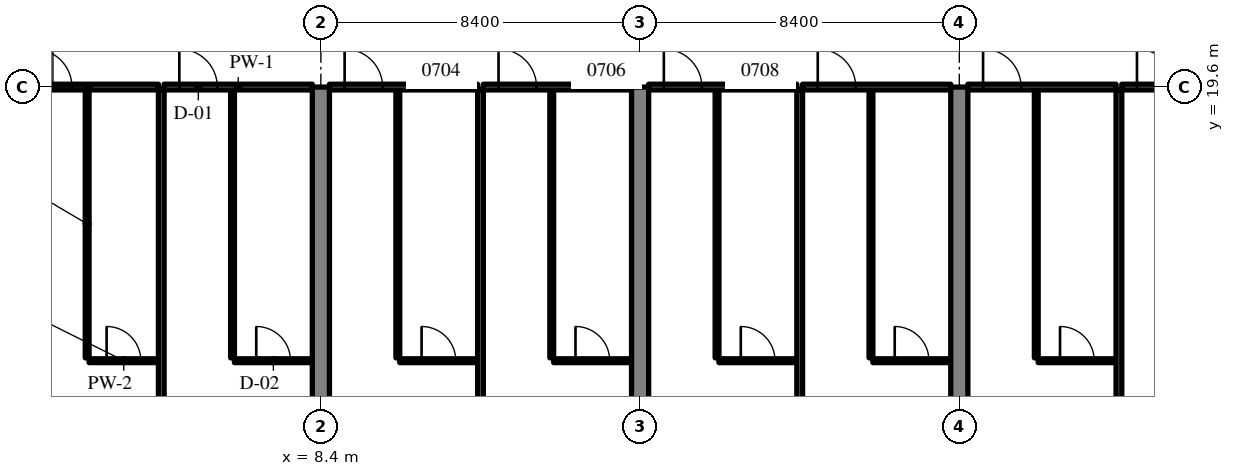
"""IFC4 building model, lengths in metres.
Left out: names, types, materials, properties, quantities, classifications, styles, units other than length and angle.
Written with IfcOpenShell. Run it as: python <this file> out.ifc"""

import sys

from ifc_helpers import new_model, si_unit, direction, frame, frame_2d, origin, place, context, subcontext, project, spatial, rectangle, extrude, source, transform, mapped, element, fill, save


model = new_model("IFC4")
c1 = context("Model", 3, precision=1e-05, world=origin(), true_north=direction((0.0, 1.0)))
c2 = subcontext(c1, "Body", "Model", "MODEL_VIEW")
j1 = project(units=[si_unit("LENGTHUNIT", "METRE"), si_unit("PLANEANGLEUNIT", "RADIAN")], contexts=[c1])
p1 = place(None, origin())
s1 = spatial("IfcSite", under=j1, at=p1, CompositionType="ELEMENT")
p2 = place(p1, origin())
s2 = spatial("IfcBuilding", under=s1, at=p2, CompositionType="ELEMENT")
p3 = place(p2, frame((0.0, 0.0, 35.4)))
s3 = spatial("IfcBuildingStorey", under=s2, at=p3, CompositionType="ELEMENT", Elevation=35.4)
m1 = source(origin(), c2, "Body", "SweptSolid", [
    extrude(rectangle(XDim=19.6, YDim=0.45, at=frame_2d((9.8, 0.0))), origin(), (0.0, 0.0, 1.0), 3.52),
])
for number, where, z_axis, x_axis in (
    (1, (8.4, 0.0, 0.0), (0.0, 0.0, 1.0), (0.0, 1.0, 0.0)),
    (2, (16.8, 0.0, 0.0), (0.0, 0.0, 1.0), (0.0, 1.0, 0.0)),
    (3, (25.2, 0.0, 0.0), (0.0, 0.0, 1.0), (0.0, 1.0, 0.0)),
):
    element("IfcWall", number, at=place(p3, frame(where, z_axis=z_axis, x_axis=x_axis)), inside=s3, PredefinedType="SHEAR", context=c2, shape_type="MappedRepresentation", body=[
        mapped(m1, transform((0.0, 0.0, 0.0), scale=1.0)),
    ])
m2 = source(origin(), c2, "Body", "SweptSolid", [
    extrude(rectangle(XDim=7.05, YDim=0.1, at=frame_2d((3.525, 0.0))), origin(), (0.0, 0.0, 1.0), 3.52),
])
p4 = place(p3, frame((2.25, 12.475, 0.0), z_axis=(0.0, 0.0, 1.0), x_axis=(0.0, 1.0, 0.0)))
e4 = element("IfcWall", 4, at=p4, inside=s3, PredefinedType="PARTITIONING", context=c2, shape_type="MappedRepresentation", body=[
    mapped(m2, transform((0.0, 0.0, 0.0), scale=1.0)),
])
m3 = source(origin(), c2, "Body", "SweptSolid", [
    extrude(rectangle(XDim=1.825, YDim=0.1, at=frame_2d((0.913, 0.0))), origin(), (0.0, 0.0, 1.0), 3.52),
])
p5 = place(p3, frame((2.3, 12.4, 0.0), z_axis=(0.0, 0.0, 1.0), x_axis=(1.0, 0.0, 0.0)))
e5 = element("IfcWall", 5, at=p5, inside=s3, PredefinedType="PARTITIONING", context=c2, shape_type="MappedRepresentation", body=[
    mapped(m3, transform((0.0, 0.0, 0.0), scale=1.0)),
])
m4 = source(origin(), c2, "Body", "SweptSolid", [
    extrude(rectangle(XDim=0.9, YDim=2.1, at=frame_2d((0.45, 1.05))), frame((0.0, 0.06, 0.0), z_axis=(0.0, -1.0, 0.0), x_axis=(1.0, 0.0, 0.0)), (0.0, 0.0, 1.0), 0.12),
])
p6 = place(p5, frame((0.462, 0.0, 0.0)))
e6 = element("IfcOpeningElement", 6, at=p6, cuts=e5, PredefinedType="OPENING", context=c2, shape_type="MappedRepresentation", body=[
    mapped(m4, transform((0.0, 0.0, 0.0), scale=1.0)),
])
m5 = source(origin(), c2, "Body", "SweptSolid", [
    extrude(rectangle(XDim=3.675, YDim=0.15, at=frame_2d((1.837, 0.0))), origin(), (0.0, 0.0, 1.0), 2.82),
])
p7 = place(p3, frame((0.45, 19.6, 0.0), z_axis=(0.0, 0.0, 1.0), x_axis=(1.0, 0.0, 0.0)))
e7 = element("IfcWall", 7, at=p7, inside=s3, PredefinedType="PARTITIONING", context=c2, shape_type="MappedRepresentation", body=[
    mapped(m5, transform((0.0, 0.0, 0.0), scale=1.0)),
])
m6 = source(origin(), c2, "Body", "SweptSolid", [
    extrude(rectangle(XDim=1.0, YDim=2.1, at=frame_2d((0.5, 1.05))), frame((0.0, 0.085, 0.0), z_axis=(0.0, -1.0, 0.0), x_axis=(1.0, 0.0, 0.0)), (0.0, 0.0, 1.0), 0.17),
])
p8 = place(p7, frame((0.4, 0.0, 0.0)))
e8 = element("IfcOpeningElement", 8, at=p8, cuts=e7, PredefinedType="OPENING", context=c2, shape_type="MappedRepresentation", body=[
    mapped(m6, transform((0.0, 0.0, 0.0), scale=1.0)),
])
p9 = place(p3, frame((6.075, 12.475, 0.0), z_axis=(0.0, 0.0, 1.0), x_axis=(0.0, 1.0, 0.0)))
e9 = element("IfcWall", 9, at=p9, inside=s3, PredefinedType="PARTITIONING", context=c2, shape_type="MappedRepresentation", body=[
    mapped(m2, transform((0.0, 0.0, 0.0), scale=1.0)),
])
m7 = source(origin(), c2, "Body", "SweptSolid", [
    extrude(rectangle(XDim=2.05, YDim=0.1, at=frame_2d((1.025, 0.0))), origin(), (0.0, 0.0, 1.0), 3.52),
])
p10 = place(p3, frame((6.125, 12.4, 0.0), z_axis=(0.0, 0.0, 1.0), x_axis=(1.0, 0.0, 0.0)))
e10 = element("IfcWall", 10, at=p10, inside=s3, PredefinedType="PARTITIONING", context=c2, shape_type="MappedRepresentation", body=[
    mapped(m7, transform((0.0, 0.0, 0.0), scale=1.0)),
])
p11 = place(p10, frame((0.575, 0.0, 0.0)))
e11 = element("IfcOpeningElement", 11, at=p11, cuts=e10, PredefinedType="OPENING", context=c2, shape_type="MappedRepresentation", body=[
    mapped(m4, transform((0.0, 0.0, 0.0), scale=1.0)),
])
m8 = source(origin(), c2, "Body", "SweptSolid", [
    extrude(rectangle(XDim=3.9, YDim=0.15, at=frame_2d((1.95, 0.0))), origin(), (0.0, 0.0, 1.0), 2.82),
])
p12 = place(p3, frame((4.275, 19.6, 0.0), z_axis=(0.0, 0.0, 1.0), x_axis=(1.0, 0.0, 0.0)))
e12 = element("IfcWall", 12, at=p12, inside=s3, PredefinedType="PARTITIONING", context=c2, shape_type="MappedRepresentation", body=[
    mapped(m8, transform((0.0, 0.0, 0.0), scale=1.0)),
])
p13 = place(p12, frame((0.4, 0.0, 0.0)))
e13 = element("IfcOpeningElement", 13, at=p13, cuts=e12, PredefinedType="OPENING", context=c2, shape_type="MappedRepresentation", body=[
    mapped(m6, transform((0.0, 0.0, 0.0), scale=1.0)),
])
m9 = source(origin(), c2, "Body", "SweptSolid", [
    extrude(rectangle(XDim=18.947, YDim=0.15, at=frame_2d((9.474, 0.0))), origin(), (0.0, 0.0, 1.0), 3.52),
])
p14 = place(p3, frame((4.2, 0.578, 0.0), z_axis=(0.0, 0.0, 1.0), x_axis=(0.0, 1.0, 0.0)))
e14 = element("IfcWall", 14, at=p14, inside=s3, PredefinedType="PARTITIONING", context=c2, shape_type="MappedRepresentation", body=[
    mapped(m9, transform((0.0, 0.0, 0.0), scale=1.0)),
])
p15 = place(p3, frame((10.425, 12.475, 0.0), z_axis=(0.0, 0.0, 1.0), x_axis=(0.0, 1.0, 0.0)))
e15 = element("IfcWall", 15, at=p15, inside=s3, PredefinedType="PARTITIONING", context=c2, shape_type="MappedRepresentation", body=[
    mapped(m2, transform((0.0, 0.0, 0.0), scale=1.0)),
])
m10 = source(origin(), c2, "Body", "SweptSolid", [
    extrude(rectangle(XDim=2.05, YDim=0.1, at=frame_2d((1.025, 0.0))), origin(), (0.0, 0.0, 1.0), 3.52),
])
p16 = place(p3, frame((10.475, 12.4, 0.0), z_axis=(0.0, 0.0, 1.0), x_axis=(1.0, 0.0, 0.0)))
e16 = element("IfcWall", 16, at=p16, inside=s3, PredefinedType="PARTITIONING", context=c2, shape_type="MappedRepresentation", body=[
    mapped(m10, transform((0.0, 0.0, 0.0), scale=1.0)),
])
p17 = place(p16, frame((0.575, 0.0, 0.0)))
e17 = element("IfcOpeningElement", 17, at=p17, cuts=e16, PredefinedType="OPENING", context=c2, shape_type="MappedRepresentation", body=[
    mapped(m4, transform((0.0, 0.0, 0.0), scale=1.0)),
])
m11 = source(origin(), c2, "Body", "SweptSolid", [
    extrude(rectangle(XDim=3.9, YDim=0.15, at=frame_2d((1.95, 0.0))), origin(), (0.0, 0.0, 1.0), 2.82),
])
p18 = place(p3, frame((8.625, 19.6, 0.0), z_axis=(0.0, 0.0, 1.0), x_axis=(1.0, 0.0, 0.0)))
e18 = element("IfcWall", 18, at=p18, inside=s3, PredefinedType="PARTITIONING", context=c2, shape_type="MappedRepresentation", body=[
    mapped(m11, transform((0.0, 0.0, 0.0), scale=1.0)),
])
p19 = place(p18, frame((0.4, 0.0, 0.0)))
e19 = element("IfcOpeningElement", 19, at=p19, cuts=e18, PredefinedType="OPENING", context=c2, shape_type="MappedRepresentation", body=[
    mapped(m6, transform((0.0, 0.0, 0.0), scale=1.0)),
])
p20 = place(p3, frame((14.475, 12.475, 0.0), z_axis=(0.0, 0.0, 1.0), x_axis=(0.0, 1.0, 0.0)))
e20 = element("IfcWall", 20, at=p20, inside=s3, PredefinedType="PARTITIONING", context=c2, shape_type="MappedRepresentation", body=[
    mapped(m2, transform((0.0, 0.0, 0.0), scale=1.0)),
])
p21 = place(p3, frame((14.525, 12.4, 0.0), z_axis=(0.0, 0.0, 1.0), x_axis=(1.0, 0.0, 0.0)))
e21 = element("IfcWall", 21, at=p21, inside=s3, PredefinedType="PARTITIONING", context=c2, shape_type="MappedRepresentation", body=[
    mapped(m7, transform((0.0, 0.0, 0.0), scale=1.0)),
])
p22 = place(p21, frame((0.575, 0.0, 0.0)))
e22 = element("IfcOpeningElement", 22, at=p22, cuts=e21, PredefinedType="OPENING", context=c2, shape_type="MappedRepresentation", body=[
    mapped(m4, transform((0.0, 0.0, 0.0), scale=1.0)),
])
p23 = place(p3, frame((12.675, 19.6, 0.0), z_axis=(0.0, 0.0, 1.0), x_axis=(1.0, 0.0, 0.0)))
e23 = element("IfcWall", 23, at=p23, inside=s3, PredefinedType="PARTITIONING", context=c2, shape_type="MappedRepresentation", body=[
    mapped(m11, transform((0.0, 0.0, 0.0), scale=1.0)),
])
p24 = place(p23, frame((0.4, 0.0, 0.0)))
e24 = element("IfcOpeningElement", 24, at=p24, cuts=e23, PredefinedType="OPENING", context=c2, shape_type="MappedRepresentation", body=[
    mapped(m6, transform((0.0, 0.0, 0.0), scale=1.0)),
])
m12 = source(origin(), c2, "Body", "SweptSolid", [
    extrude(rectangle(XDim=18.625, YDim=0.15, at=frame_2d((9.312, 0.0))), origin(), (0.0, 0.0, 1.0), 3.52),
])
p25 = place(p3, frame((12.6, 0.9, 0.0), z_axis=(0.0, 0.0, 1.0), x_axis=(0.0, 1.0, 0.0)))
e25 = element("IfcWall", 25, at=p25, inside=s3, PredefinedType="PARTITIONING", context=c2, shape_type="MappedRepresentation", body=[
    mapped(m12, transform((0.0, 0.0, 0.0), scale=1.0)),
])
p26 = place(p3, frame((18.825, 12.475, 0.0), z_axis=(0.0, 0.0, 1.0), x_axis=(0.0, 1.0, 0.0)))
e26 = element("IfcWall", 26, at=p26, inside=s3, PredefinedType="PARTITIONING", context=c2, shape_type="MappedRepresentation", body=[
    mapped(m2, transform((0.0, 0.0, 0.0), scale=1.0)),
])
p27 = place(p3, frame((18.875, 12.4, 0.0), z_axis=(0.0, 0.0, 1.0), x_axis=(1.0, 0.0, 0.0)))
e27 = element("IfcWall", 27, at=p27, inside=s3, PredefinedType="PARTITIONING", context=c2, shape_type="MappedRepresentation", body=[
    mapped(m7, transform((0.0, 0.0, 0.0), scale=1.0)),
])
p28 = place(p27, frame((0.575, 0.0, 0.0)))
e28 = element("IfcOpeningElement", 28, at=p28, cuts=e27, PredefinedType="OPENING", context=c2, shape_type="MappedRepresentation", body=[
    mapped(m4, transform((0.0, 0.0, 0.0), scale=1.0)),
])
p29 = place(p3, frame((17.025, 19.6, 0.0), z_axis=(0.0, 0.0, 1.0), x_axis=(1.0, 0.0, 0.0)))
e29 = element("IfcWall", 29, at=p29, inside=s3, PredefinedType="PARTITIONING", context=c2, shape_type="MappedRepresentation", body=[
    mapped(m8, transform((0.0, 0.0, 0.0), scale=1.0)),
])
p30 = place(p29, frame((0.4, 0.0, 0.0)))
e30 = element("IfcOpeningElement", 30, at=p30, cuts=e29, PredefinedType="OPENING", context=c2, shape_type="MappedRepresentation", body=[
    mapped(m6, transform((0.0, 0.0, 0.0), scale=1.0)),
])
p31 = place(p3, frame((22.875, 12.475, 0.0), z_axis=(0.0, 0.0, 1.0), x_axis=(0.0, 1.0, 0.0)))
e31 = element("IfcWall", 31, at=p31, inside=s3, PredefinedType="PARTITIONING", context=c2, shape_type="MappedRepresentation", body=[
    mapped(m2, transform((0.0, 0.0, 0.0), scale=1.0)),
])
p32 = place(p3, frame((22.925, 12.4, 0.0), z_axis=(0.0, 0.0, 1.0), x_axis=(1.0, 0.0, 0.0)))
e32 = element("IfcWall", 32, at=p32, inside=s3, PredefinedType="PARTITIONING", context=c2, shape_type="MappedRepresentation", body=[
    mapped(m7, transform((0.0, 0.0, 0.0), scale=1.0)),
])
p33 = place(p32, frame((0.575, 0.0, 0.0)))
e33 = element("IfcOpeningElement", 33, at=p33, cuts=e32, PredefinedType="OPENING", context=c2, shape_type="MappedRepresentation", body=[
    mapped(m4, transform((0.0, 0.0, 0.0), scale=1.0)),
])
p34 = place(p3, frame((21.075, 19.6, 0.0), z_axis=(0.0, 0.0, 1.0), x_axis=(1.0, 0.0, 0.0)))
e34 = element("IfcWall", 34, at=p34, inside=s3, PredefinedType="PARTITIONING", context=c2, shape_type="MappedRepresentation", body=[
    mapped(m8, transform((0.0, 0.0, 0.0), scale=1.0)),
])
p35 = place(p34, frame((0.4, 0.0, 0.0)))
e35 = element("IfcOpeningElement", 35, at=p35, cuts=e34, PredefinedType="OPENING", context=c2, shape_type="MappedRepresentation", body=[
    mapped(m6, transform((0.0, 0.0, 0.0), scale=1.0)),
])
p36 = place(p3, frame((21.0, 0.9, 0.0), z_axis=(0.0, 0.0, 1.0), x_axis=(0.0, 1.0, 0.0)))
e36 = element("IfcWall", 36, at=p36, inside=s3, PredefinedType="PARTITIONING", context=c2, shape_type="MappedRepresentation", body=[
    mapped(m12, transform((0.0, 0.0, 0.0), scale=1.0)),
])
p37 = place(p3, frame((27.225, 12.475, 0.0), z_axis=(0.0, 0.0, 1.0), x_axis=(0.0, 1.0, 0.0)))
e37 = element("IfcWall", 37, at=p37, inside=s3, PredefinedType="PARTITIONING", context=c2, shape_type="MappedRepresentation", body=[
    mapped(m2, transform((0.0, 0.0, 0.0), scale=1.0)),
])
p38 = place(p3, frame((27.275, 12.4, 0.0), z_axis=(0.0, 0.0, 1.0), x_axis=(1.0, 0.0, 0.0)))
e38 = element("IfcWall", 38, at=p38, inside=s3, PredefinedType="PARTITIONING", context=c2, shape_type="MappedRepresentation", body=[
    mapped(m7, transform((0.0, 0.0, 0.0), scale=1.0)),
])
p39 = place(p38, frame((0.575, 0.0, 0.0)))
e39 = element("IfcOpeningElement", 39, at=p39, cuts=e38, PredefinedType="OPENING", context=c2, shape_type="MappedRepresentation", body=[
    mapped(m4, transform((0.0, 0.0, 0.0), scale=1.0)),
])
p40 = place(p3, frame((25.425, 19.6, 0.0), z_axis=(0.0, 0.0, 1.0), x_axis=(1.0, 0.0, 0.0)))
e40 = element("IfcWall", 40, at=p40, inside=s3, PredefinedType="PARTITIONING", context=c2, shape_type="MappedRepresentation", body=[
    mapped(m11, transform((0.0, 0.0, 0.0), scale=1.0)),
])
p41 = place(p40, frame((0.4, 0.0, 0.0)))
e41 = element("IfcOpeningElement", 41, at=p41, cuts=e40, PredefinedType="OPENING", context=c2, shape_type="MappedRepresentation", body=[
    mapped(m6, transform((0.0, 0.0, 0.0), scale=1.0)),
])
p42 = place(p3, frame((29.475, 19.6, 0.0), z_axis=(0.0, 0.0, 1.0), x_axis=(1.0, 0.0, 0.0)))
e42 = element("IfcWall", 42, at=p42, inside=s3, PredefinedType="PARTITIONING", context=c2, shape_type="MappedRepresentation", body=[
    mapped(m11, transform((0.0, 0.0, 0.0), scale=1.0)),
])
p43 = place(p42, frame((0.4, 0.0, 0.0)))
e43 = element("IfcOpeningElement", 43, at=p43, cuts=e42, PredefinedType="OPENING", context=c2, shape_type="MappedRepresentation", body=[
    mapped(m6, transform((0.0, 0.0, 0.0), scale=1.0)),
])
p44 = place(p3, frame((29.4, 0.9, 0.0), z_axis=(0.0, 0.0, 1.0), x_axis=(0.0, 1.0, 0.0)))
e44 = element("IfcWall", 44, at=p44, inside=s3, PredefinedType="PARTITIONING", context=c2, shape_type="MappedRepresentation", body=[
    mapped(m12, transform((0.0, 0.0, 0.0), scale=1.0)),
])
m13 = source(origin(), c2, "Body", "SweptSolid", [
    extrude(rectangle(XDim=0.9, YDim=2.1, at=frame_2d((0.45, 1.05))), frame((0.0, 0.025, 0.0), z_axis=(0.0, -1.0, 0.0), x_axis=(1.0, 0.0, 0.0)), (0.0, 0.0, 1.0), 0.05),
])
p45 = place(p6, origin())
e45 = element("IfcDoor", 45, at=p45, inside=s3, OperationType="SINGLE_SWING_LEFT", PredefinedType="DOOR", context=c2, shape_type="MappedRepresentation", body=[
    mapped(m13, transform((0.0, 0.0, 0.0), scale=1.0)),
])
fill(e6, e45)
m14 = source(origin(), c2, "Body", "SweptSolid", [
    extrude(rectangle(XDim=1.0, YDim=2.1, at=frame_2d((0.5, 1.05))), frame((0.0, 0.025, 0.0), z_axis=(0.0, -1.0, 0.0), x_axis=(1.0, 0.0, 0.0)), (0.0, 0.0, 1.0), 0.05),
])
p46 = place(p8, origin())
e46 = element("IfcDoor", 46, at=p46, inside=s3, OperationType="SINGLE_SWING_LEFT", PredefinedType="DOOR", context=c2, shape_type="MappedRepresentation", body=[
    mapped(m14, transform((0.0, 0.0, 0.0), scale=1.0)),
])
fill(e8, e46)
p47 = place(p11, origin())
e47 = element("IfcDoor", 47, at=p47, inside=s3, OperationType="SINGLE_SWING_LEFT", PredefinedType="DOOR", context=c2, shape_type="MappedRepresentation", body=[
    mapped(m13, transform((0.0, 0.0, 0.0), scale=1.0)),
])
fill(e11, e47)
p48 = place(p13, origin())
e48 = element("IfcDoor", 48, at=p48, inside=s3, OperationType="SINGLE_SWING_LEFT", PredefinedType="DOOR", context=c2, shape_type="MappedRepresentation", body=[
    mapped(m14, transform((0.0, 0.0, 0.0), scale=1.0)),
])
fill(e13, e48)
p49 = place(p17, origin())
e49 = element("IfcDoor", 49, at=p49, inside=s3, OperationType="SINGLE_SWING_LEFT", PredefinedType="DOOR", context=c2, shape_type="MappedRepresentation", body=[
    mapped(m13, transform((0.0, 0.0, 0.0), scale=1.0)),
])
fill(e17, e49)
p50 = place(p19, origin())
e50 = element("IfcDoor", 50, at=p50, inside=s3, OperationType="SINGLE_SWING_LEFT", PredefinedType="DOOR", context=c2, shape_type="MappedRepresentation", body=[
    mapped(m14, transform((0.0, 0.0, 0.0), scale=1.0)),
])
fill(e19, e50)
p51 = place(p22, origin())
e51 = element("IfcDoor", 51, at=p51, inside=s3, OperationType="SINGLE_SWING_LEFT", PredefinedType="DOOR", context=c2, shape_type="MappedRepresentation", body=[
    mapped(m13, transform((0.0, 0.0, 0.0), scale=1.0)),
])
fill(e22, e51)
p52 = place(p24, origin())
e52 = element("IfcDoor", 52, at=p52, inside=s3, OperationType="SINGLE_SWING_LEFT", PredefinedType="DOOR", context=c2, shape_type="MappedRepresentation", body=[
    mapped(m14, transform((0.0, 0.0, 0.0), scale=1.0)),
])
fill(e24, e52)
p53 = place(p28, origin())
e53 = element("IfcDoor", 53, at=p53, inside=s3, OperationType="SINGLE_SWING_LEFT", PredefinedType="DOOR", context=c2, shape_type="MappedRepresentation", body=[
    mapped(m13, transform((0.0, 0.0, 0.0), scale=1.0)),
])
fill(e28, e53)
p54 = place(p30, origin())
e54 = element("IfcDoor", 54, at=p54, inside=s3, OperationType="SINGLE_SWING_LEFT", PredefinedType="DOOR", context=c2, shape_type="MappedRepresentation", body=[
    mapped(m14, transform((0.0, 0.0, 0.0), scale=1.0)),
])
fill(e30, e54)
p55 = place(p33, origin())
e55 = element("IfcDoor", 55, at=p55, inside=s3, OperationType="SINGLE_SWING_LEFT", PredefinedType="DOOR", context=c2, shape_type="MappedRepresentation", body=[
    mapped(m13, transform((0.0, 0.0, 0.0), scale=1.0)),
])
fill(e33, e55)
p56 = place(p35, origin())
e56 = element("IfcDoor", 56, at=p56, inside=s3, OperationType="SINGLE_SWING_LEFT", PredefinedType="DOOR", context=c2, shape_type="MappedRepresentation", body=[
    mapped(m14, transform((0.0, 0.0, 0.0), scale=1.0)),
])
fill(e35, e56)
p57 = place(p39, origin())
e57 = element("IfcDoor", 57, at=p57, inside=s3, OperationType="SINGLE_SWING_LEFT", PredefinedType="DOOR", context=c2, shape_type="MappedRepresentation", body=[
    mapped(m13, transform((0.0, 0.0, 0.0), scale=1.0)),
])
fill(e39, e57)
p58 = place(p41, origin())
e58 = element("IfcDoor", 58, at=p58, inside=s3, OperationType="SINGLE_SWING_LEFT", PredefinedType="DOOR", context=c2, shape_type="MappedRepresentation", body=[
    mapped(m14, transform((0.0, 0.0, 0.0), scale=1.0)),
])
fill(e41, e58)
p59 = place(p43, origin())
e59 = element("IfcDoor", 59, at=p59, inside=s3, OperationType="SINGLE_SWING_LEFT", PredefinedType="DOOR", context=c2, shape_type="MappedRepresentation", body=[
    mapped(m14, transform((0.0, 0.0, 0.0), scale=1.0)),
])
fill(e43, e59)
save(model, sys.argv[1])
